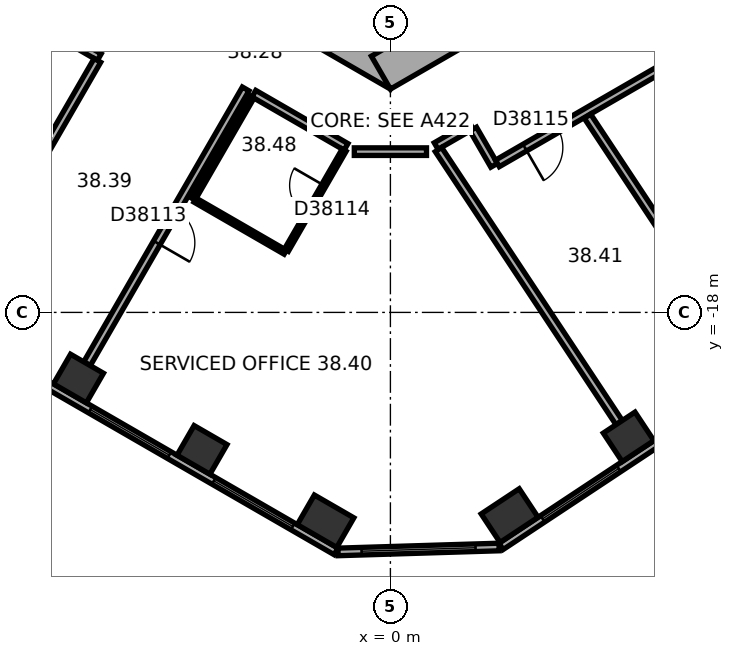
"""IFC4 building model, lengths in metres.
Left out: names, types, materials, properties, quantities, classifications, styles, units other than length and angle.
Written with IfcOpenShell. Run it as: python <this file> out.ifc"""

import sys

from ifc_helpers import new_model, si_unit, direction, frame, frame_2d, origin, origin_2d, place, context, subcontext, project, spatial, rectangle, extrude, element, fill, save


model = new_model("IFC4")
c1 = context("Model", 3, precision=1e-05, world=origin(), true_north=direction((0.0, 1.0)))
c2 = subcontext(c1, "Body", "Model", "MODEL_VIEW")
j1 = project(units=[si_unit("LENGTHUNIT", "METRE"), si_unit("PLANEANGLEUNIT", "RADIAN")], contexts=[c1])
p1 = place(None, origin())
s1 = spatial("IfcSite", under=j1, at=p1, CompositionType="ELEMENT")
p2 = place(p1, origin())
s2 = spatial("IfcBuilding", under=s1, at=p2, CompositionType="ELEMENT")
p3 = place(p2, frame((0.0, 0.0, 157.7)))
s3 = spatial("IfcBuildingStorey", under=s2, at=p3, CompositionType="ELEMENT", Elevation=157.7)
for number, where, z_axis, x_axis in (
    (1, (-8.208, -19.74, 0.0), (0.0, 0.0, 1.0), (0.866, -0.5, 0.0)),
    (2, (-4.958, -21.617, 0.0), (0.0, 0.0, 1.0), (0.866, -0.5, 0.0)),
):
    element("IfcColumn", number, at=place(p3, frame(where, z_axis=z_axis, x_axis=x_axis)), inside=s3, PredefinedType="COLUMN", context=c2, shape_type="SweptSolid", body=[
        extrude(rectangle(XDim=1.0, YDim=0.9, at=origin_2d()), origin(), (0.0, 0.0, 1.0), 3.7),
    ])
for number, where, z_axis, x_axis in (
    (3, (-1.706, -23.494, 0.0), (0.0, 0.0, 1.0), (0.866, -0.5, 0.0)),
    (4, (3.137, -23.346, 0.0), (0.0, 0.0, 1.0), (0.834, 0.552, 0.0)),
):
    element("IfcColumn", number, at=place(p3, frame(where, z_axis=z_axis, x_axis=x_axis)), inside=s3, PredefinedType="COLUMN", context=c2, shape_type="SweptSolid", body=[
        extrude(rectangle(XDim=1.2, YDim=0.9, at=origin_2d()), origin(), (0.0, 0.0, 1.0), 3.7),
    ])
p4 = place(p3, frame((6.268, -21.274, 0.0), z_axis=(0.0, 0.0, 1.0), x_axis=(0.833885822067, 0.551936985312, 0.0)))
e5 = element("IfcColumn", 5, at=p4, inside=s3, PredefinedType="COLUMN", context=c2, shape_type="SweptSolid", body=[
    extrude(rectangle(XDim=1.0, YDim=0.9, at=origin_2d()), origin(), (0.0, 0.0, 1.0), 3.7),
])
p5 = place(p3, frame((-10.25, -5.629, 0.0), z_axis=(0.0, 0.0, 1.0), x_axis=(0.866022616891, -0.50000482701, 0.0)))
e6 = element("IfcWall", 6, at=p5, inside=s3, PredefinedType="SHEAR", context=c2, shape_type="SweptSolid", body=[
    extrude(rectangle(XDim=12.125, YDim=1.0, at=frame_2d((6.062, 0.0))), origin(), (0.0, 0.0, 1.0), 3.7),
])
p6 = place(p5, frame((6.262, 0.0, 0.0)))
e7 = element("IfcOpeningElement", 7, at=p6, cuts=e6, PredefinedType="OPENING", context=c2, shape_type="SweptSolid", body=[
    extrude(rectangle(XDim=1.5, YDim=2.1, at=frame_2d((0.75, 1.05))), frame((0.0, 0.51, 0.0), z_axis=(0.0, -1.0, 0.0), x_axis=(1.0, 0.0, 0.0)), (0.0, 0.0, 1.0), 1.02),
])
p7 = place(p5, frame((1.712, 0.0, 0.0)))
e8 = element("IfcOpeningElement", 8, at=p7, cuts=e6, PredefinedType="OPENING", context=c2, shape_type="SweptSolid", body=[
    extrude(rectangle(XDim=1.1, YDim=2.1, at=frame_2d((0.55, 1.05))), frame((0.0, 0.51, 0.0), z_axis=(0.0, -1.0, 0.0), x_axis=(1.0, 0.0, 0.0)), (0.0, 0.0, 1.0), 1.02),
])
p8 = place(p5, frame((4.312, 0.0, 0.0)))
e9 = element("IfcOpeningElement", 9, at=p8, cuts=e6, PredefinedType="OPENING", context=c2, shape_type="SweptSolid", body=[
    extrude(rectangle(XDim=1.1, YDim=2.1, at=frame_2d((0.55, 1.05))), frame((0.0, 0.51, 0.0), z_axis=(0.0, -1.0, 0.0), x_axis=(1.0, 0.0, 0.0)), (0.0, 0.0, 1.0), 1.02),
])
p9 = place(p3, frame((-0.25, -11.691, 0.0), z_axis=(0.0, 0.0, 1.0), x_axis=(0.866022616891, 0.50000482701, 0.0)))
e10 = element("IfcWall", 10, at=p9, inside=s3, PredefinedType="SHEAR", context=c2, shape_type="SweptSolid", body=[
    extrude(rectangle(XDim=12.125, YDim=1.0, at=frame_2d((6.062, 0.0))), origin(), (0.0, 0.0, 1.0), 3.7),
])
p10 = place(p9, frame((2.612, 0.0, 0.0)))
e11 = element("IfcOpeningElement", 11, at=p10, cuts=e10, PredefinedType="OPENING", context=c2, shape_type="SweptSolid", body=[
    extrude(rectangle(XDim=1.1, YDim=2.1, at=frame_2d((0.55, 1.05))), frame((0.0, 0.51, 0.0), z_axis=(0.0, -1.0, 0.0), x_axis=(1.0, 0.0, 0.0)), (0.0, 0.0, 1.0), 1.02),
])
p11 = place(p9, frame((5.212, 0.0, 0.0)))
e12 = element("IfcOpeningElement", 12, at=p11, cuts=e10, PredefinedType="OPENING", context=c2, shape_type="SweptSolid", body=[
    extrude(rectangle(XDim=1.1, YDim=2.1, at=frame_2d((0.55, 1.05))), frame((0.0, 0.51, 0.0), z_axis=(0.0, -1.0, 0.0), x_axis=(1.0, 0.0, 0.0)), (0.0, 0.0, 1.0), 1.02),
])
p12 = place(p9, frame((7.812, 0.0, 0.0)))
e13 = element("IfcOpeningElement", 13, at=p12, cuts=e10, PredefinedType="OPENING", context=c2, shape_type="SweptSolid", body=[
    extrude(rectangle(XDim=1.1, YDim=2.1, at=frame_2d((0.55, 1.05))), frame((0.0, 0.51, 0.0), z_axis=(0.0, -1.0, 0.0), x_axis=(1.0, 0.0, 0.0)), (0.0, 0.0, 1.0), 1.02),
])
p13 = place(p3, frame((-18.789, -14.267, 0.0), z_axis=(0.0, 0.0, 1.0), x_axis=(0.866023315909, -0.500003616288, 0.0)))
e14 = element("IfcWall", 14, at=p13, inside=s3, PredefinedType="STANDARD", context=c2, shape_type="SweptSolid", body=[
    extrude(rectangle(XDim=20.044, YDim=0.2, at=frame_2d((10.022, 0.0))), origin(), (0.0, 0.0, 1.0), 3.7),
])
p14 = place(p13, frame((1.314, 0.0, 0.9)))
e15 = element("IfcOpeningElement", 15, at=p14, cuts=e14, PredefinedType="OPENING", context=c2, shape_type="SweptSolid", body=[
    extrude(rectangle(XDim=2.4, YDim=2.0, at=frame_2d((1.2, 1.0))), frame((0.0, 0.11, 0.0), z_axis=(0.0, -1.0, 0.0), x_axis=(1.0, 0.0, 0.0)), (0.0, 0.0, 1.0), 0.22),
])
p15 = place(p13, frame((5.069, 0.0, 0.9)))
e16 = element("IfcOpeningElement", 16, at=p15, cuts=e14, PredefinedType="OPENING", context=c2, shape_type="SweptSolid", body=[
    extrude(rectangle(XDim=2.4, YDim=2.0, at=frame_2d((1.2, 1.0))), frame((0.0, 0.11, 0.0), z_axis=(0.0, -1.0, 0.0), x_axis=(1.0, 0.0, 0.0)), (0.0, 0.0, 1.0), 0.22),
])
p16 = place(p13, frame((8.823, 0.0, 0.9)))
e17 = element("IfcOpeningElement", 17, at=p16, cuts=e14, PredefinedType="OPENING", context=c2, shape_type="SweptSolid", body=[
    extrude(rectangle(XDim=2.4, YDim=2.0, at=frame_2d((1.2, 1.0))), frame((0.0, 0.11, 0.0), z_axis=(0.0, -1.0, 0.0), x_axis=(1.0, 0.0, 0.0)), (0.0, 0.0, 1.0), 0.22),
])
p17 = place(p13, frame((12.577, 0.0, 0.9)))
e18 = element("IfcOpeningElement", 18, at=p17, cuts=e14, PredefinedType="OPENING", context=c2, shape_type="SweptSolid", body=[
    extrude(rectangle(XDim=2.4, YDim=2.0, at=frame_2d((1.2, 1.0))), frame((0.0, 0.11, 0.0), z_axis=(0.0, -1.0, 0.0), x_axis=(1.0, 0.0, 0.0)), (0.0, 0.0, 1.0), 0.22),
])
p18 = place(p13, frame((16.331, 0.0, 0.9)))
e19 = element("IfcOpeningElement", 19, at=p18, cuts=e14, PredefinedType="OPENING", context=c2, shape_type="SweptSolid", body=[
    extrude(rectangle(XDim=2.4, YDim=2.0, at=frame_2d((1.2, 1.0))), frame((0.0, 0.11, 0.0), z_axis=(0.0, -1.0, 0.0), x_axis=(1.0, 0.0, 0.0)), (0.0, 0.0, 1.0), 0.22),
])
p19 = place(p3, frame((-1.378, -24.302, 0.0), z_axis=(0.0, 0.0, 1.0), x_axis=(0.999533857267, 0.030529791629, 0.0)))
e20 = element("IfcWall", 20, at=p19, inside=s3, PredefinedType="STANDARD", context=c2, shape_type="SweptSolid", body=[
    extrude(rectangle(XDim=4.238, YDim=0.2, at=frame_2d((2.119, 0.0))), origin(), (0.0, 0.0, 1.0), 3.7),
])
p20 = place(p19, frame((0.619, 0.0, 0.9)))
e21 = element("IfcOpeningElement", 21, at=p20, cuts=e20, PredefinedType="OPENING", context=c2, shape_type="SweptSolid", body=[
    extrude(rectangle(XDim=3.0, YDim=2.0, at=frame_2d((1.5, 1.0))), frame((0.0, 0.11, 0.0), z_axis=(0.0, -1.0, 0.0), x_axis=(1.0, 0.0, 0.0)), (0.0, 0.0, 1.0), 0.22),
])
p21 = place(p3, frame((2.911, -24.156, 0.0), z_axis=(0.0, 0.0, 1.0), x_axis=(0.833882163564, 0.551942512668, 0.0)))
e22 = element("IfcWall", 22, at=p21, inside=s3, PredefinedType="STANDARD", context=c2, shape_type="SweptSolid", body=[
    extrude(rectangle(XDim=20.044, YDim=0.2, at=frame_2d((10.022, 0.0))), origin(), (0.0, 0.0, 1.0), 3.7),
])
p22 = place(p21, frame((1.313, 0.0, 0.9)))
e23 = element("IfcOpeningElement", 23, at=p22, cuts=e22, PredefinedType="OPENING", context=c2, shape_type="SweptSolid", body=[
    extrude(rectangle(XDim=2.4, YDim=2.0, at=frame_2d((1.2, 1.0))), frame((0.0, 0.11, 0.0), z_axis=(0.0, -1.0, 0.0), x_axis=(1.0, 0.0, 0.0)), (0.0, 0.0, 1.0), 0.22),
])
p23 = place(p21, frame((5.067, 0.0, 0.9)))
e24 = element("IfcOpeningElement", 24, at=p23, cuts=e22, PredefinedType="OPENING", context=c2, shape_type="SweptSolid", body=[
    extrude(rectangle(XDim=2.4, YDim=2.0, at=frame_2d((1.2, 1.0))), frame((0.0, 0.11, 0.0), z_axis=(0.0, -1.0, 0.0), x_axis=(1.0, 0.0, 0.0)), (0.0, 0.0, 1.0), 0.22),
])
p24 = place(p21, frame((8.821, 0.0, 0.9)))
e25 = element("IfcOpeningElement", 25, at=p24, cuts=e22, PredefinedType="OPENING", context=c2, shape_type="SweptSolid", body=[
    extrude(rectangle(XDim=2.4, YDim=2.0, at=frame_2d((1.2, 1.0))), frame((0.0, 0.11, 0.0), z_axis=(0.0, -1.0, 0.0), x_axis=(1.0, 0.0, 0.0)), (0.0, 0.0, 1.0), 0.22),
])
p25 = place(p21, frame((12.575, 0.0, 0.9)))
e26 = element("IfcOpeningElement", 26, at=p25, cuts=e22, PredefinedType="OPENING", context=c2, shape_type="SweptSolid", body=[
    extrude(rectangle(XDim=2.4, YDim=2.0, at=frame_2d((1.2, 1.0))), frame((0.0, 0.11, 0.0), z_axis=(0.0, -1.0, 0.0), x_axis=(1.0, 0.0, 0.0)), (0.0, 0.0, 1.0), 0.22),
])
p26 = place(p21, frame((16.329, 0.0, 0.9)))
e27 = element("IfcOpeningElement", 27, at=p26, cuts=e22, PredefinedType="OPENING", context=c2, shape_type="SweptSolid", body=[
    extrude(rectangle(XDim=2.4, YDim=2.0, at=frame_2d((1.2, 1.0))), frame((0.0, 0.11, 0.0), z_axis=(0.0, -1.0, 0.0), x_axis=(1.0, 0.0, 0.0)), (0.0, 0.0, 1.0), 0.22),
])
p27 = place(p3, frame((-11.651, -8.978, 0.0), z_axis=(0.0, 0.0, 1.0), x_axis=(0.866010893236, -0.500025132165, 0.0)))
e28 = element("IfcWall", 28, at=p27, inside=s3, PredefinedType="PARTITIONING", context=c2, shape_type="SweptSolid", body=[
    extrude(rectangle(XDim=4.608, YDim=0.2, at=frame_2d((2.304, 0.0))), origin(), (0.0, 0.0, 1.0), 3.42),
])
p28 = place(p3, frame((-11.235, -17.474, 0.0), z_axis=(0.0, 0.0, 1.0), x_axis=(0.500009260695, 0.866020057054, 0.0)))
e29 = element("IfcWall", 29, at=p28, inside=s3, PredefinedType="PARTITIONING", context=c2, shape_type="SweptSolid", body=[
    extrude(rectangle(XDim=7.049, YDim=0.2, at=frame_2d((3.524, 0.0))), origin(), (0.0, 0.0, 1.0), 2.87),
])
p29 = place(p28, frame((3.024, 0.0, 0.0)))
e30 = element("IfcOpeningElement", 30, at=p29, cuts=e29, PredefinedType="OPENING", context=c2, shape_type="SweptSolid", body=[
    extrude(rectangle(XDim=1.0, YDim=2.1, at=frame_2d((0.5, 1.05))), frame((0.0, 0.11, 0.0), z_axis=(0.0, -1.0, 0.0), x_axis=(1.0, 0.0, 0.0)), (0.0, 0.0, 1.0), 0.22),
])
p30 = place(p3, frame((-7.984, -19.351, 0.0), z_axis=(0.0, 0.0, 1.0), x_axis=(0.500010139422, 0.866019549707, 0.0)))
e31 = element("IfcWall", 31, at=p30, inside=s3, PredefinedType="PARTITIONING", context=c2, shape_type="SweptSolid", body=[
    extrude(rectangle(XDim=8.35, YDim=0.2, at=frame_2d((4.175, 0.0))), origin(), (0.0, 0.0, 1.0), 3.42),
])
p31 = place(p30, frame((3.675, 0.0, 0.0)))
e32 = element("IfcOpeningElement", 32, at=p31, cuts=e31, PredefinedType="OPENING", context=c2, shape_type="SweptSolid", body=[
    extrude(rectangle(XDim=1.0, YDim=2.1, at=frame_2d((0.5, 1.05))), frame((0.0, 0.11, 0.0), z_axis=(0.0, -1.0, 0.0), x_axis=(1.0, 0.0, 0.0)), (0.0, 0.0, 1.0), 0.22),
])
p32 = place(p3, frame((-5.192, -15.016, 0.0), z_axis=(0.0, 0.0, 1.0), x_axis=(0.500026960575, 0.86600983753, 0.0)))
e33 = element("IfcWall", 33, at=p32, inside=s3, PredefinedType="PARTITIONING", context=c2, shape_type="SweptSolid", body=[
    extrude(rectangle(XDim=3.1, YDim=0.12, at=frame_2d((1.55, 0.0))), origin(), (0.0, 0.0, 1.0), 3.42),
])
p33 = place(p3, frame((-3.592, -12.244, 0.0), z_axis=(0.0, 0.0, 1.0), x_axis=(0.866034573852, -0.49998411664, 0.0)))
e34 = element("IfcWall", 34, at=p33, inside=s3, PredefinedType="PARTITIONING", context=c2, shape_type="SweptSolid", body=[
    extrude(rectangle(XDim=2.8, YDim=0.2, at=frame_2d((1.4, 0.0))), origin(), (0.0, 0.0, 1.0), 3.42),
])
p34 = place(p3, frame((-2.767, -16.416, 0.0), z_axis=(0.0, 0.0, 1.0), x_axis=(-0.865997131366, 0.500048966069, 0.0)))
e35 = element("IfcWall", 35, at=p34, inside=s3, PredefinedType="PARTITIONING", context=c2, shape_type="SweptSolid", body=[
    extrude(rectangle(XDim=2.74, YDim=0.12, at=frame_2d((1.37, 0.0))), origin(), (0.0, 0.0, 1.0), 3.42),
])
p35 = place(p3, frame((-1.217, -13.731, 0.0), z_axis=(0.0, 0.0, 1.0), x_axis=(-0.499991248344, -0.866030456496, 0.0)))
e36 = element("IfcWall", 36, at=p35, inside=s3, PredefinedType="PARTITIONING", context=c2, shape_type="SweptSolid", body=[
    extrude(rectangle(XDim=3.04, YDim=0.12, at=frame_2d((1.52, 0.0))), origin(), (0.0, 0.0, 1.0), 3.42),
])
p36 = place(p35, frame((1.07, 0.0, 0.0)))
e37 = element("IfcOpeningElement", 37, at=p36, cuts=e36, PredefinedType="OPENING", context=c2, shape_type="SweptSolid", body=[
    extrude(rectangle(XDim=0.9, YDim=2.1, at=frame_2d((0.45, 1.05))), frame((0.0, 0.07, 0.0), z_axis=(0.0, -1.0, 0.0), x_axis=(1.0, 0.0, 0.0)), (0.0, 0.0, 1.0), 0.14),
])
p37 = place(p3, frame((-0.95, -13.77, 0.0), z_axis=(0.0, 0.0, 1.0), x_axis=(1.0, 0.0, 0.0)))
e38 = element("IfcWall", 38, at=p37, inside=s3, PredefinedType="PARTITIONING", context=c2, shape_type="SweptSolid", body=[
    extrude(rectangle(XDim=1.9, YDim=0.2, at=frame_2d((0.95, 0.0))), origin(), (0.0, 0.0, 1.0), 3.42),
])
p38 = place(p3, frame((1.204, -13.623, 0.0), z_axis=(0.0, 0.0, 1.0), x_axis=(0.866040989419, 0.499973003918, 0.0)))
e39 = element("IfcWall", 39, at=p38, inside=s3, PredefinedType="PARTITIONING", context=c2, shape_type="SweptSolid", body=[
    extrude(rectangle(XDim=1.068, YDim=0.2, at=frame_2d((0.534, 0.0))), origin(), (0.0, 0.0, 1.0), 3.42),
])
p39 = place(p3, frame((2.179, -13.176, 0.0), z_axis=(0.0, 0.0, 1.0), x_axis=(0.499978356969, -0.866037899034, 0.0)))
e40 = element("IfcWall", 40, at=p39, inside=s3, PredefinedType="PARTITIONING", context=c2, shape_type="SweptSolid", body=[
    extrude(rectangle(XDim=1.101, YDim=0.2, at=frame_2d((0.551, 0.0))), origin(), (0.0, 0.0, 1.0), 3.42),
])
p40 = place(p3, frame((2.816, -14.079, 0.0), z_axis=(0.0, 0.0, 1.0), x_axis=(0.866021128829, 0.500007404367, 0.0)))
e41 = element("IfcWall", 41, at=p40, inside=s3, PredefinedType="PARTITIONING", context=c2, shape_type="SweptSolid", body=[
    extrude(rectangle(XDim=8.702, YDim=0.2, at=frame_2d((4.351, 0.0))), origin(), (0.0, 0.0, 1.0), 3.42),
])
p41 = place(p40, frame((0.833, 0.0, 0.0)))
e42 = element("IfcOpeningElement", 42, at=p41, cuts=e41, PredefinedType="OPENING", context=c2, shape_type="SweptSolid", body=[
    extrude(rectangle(XDim=1.0, YDim=2.1, at=frame_2d((0.5, 1.05))), frame((0.0, 0.11, 0.0), z_axis=(0.0, -1.0, 0.0), x_axis=(1.0, 0.0, 0.0)), (0.0, 0.0, 1.0), 0.22),
])
p42 = place(p3, frame((6.02, -20.899, 0.0), z_axis=(0.0, 0.0, 1.0), x_axis=(-0.551943990108, 0.833881185651, 0.0)))
e43 = element("IfcWall", 43, at=p42, inside=s3, PredefinedType="PARTITIONING", context=c2, shape_type="SweptSolid", body=[
    extrude(rectangle(XDim=8.615, YDim=0.2, at=frame_2d((4.308, 0.0))), origin(), (0.0, 0.0, 1.0), 3.42),
])
p43 = place(p3, frame((9.15, -18.827, 0.0), z_axis=(0.0, 0.0, 1.0), x_axis=(-0.551928083938, 0.83389171369, 0.0)))
e44 = element("IfcWall", 44, at=p43, inside=s3, PredefinedType="PARTITIONING", context=c2, shape_type="SweptSolid", body=[
    extrude(rectangle(XDim=7.182, YDim=0.2, at=frame_2d((3.591, 0.0))), origin(), (0.0, 0.0, 1.0), 2.87),
])
p44 = place(p17, origin())
e45 = element("IfcWindow", 45, at=p44, inside=s3, PartitioningType="SINGLE_PANEL", PredefinedType="WINDOW", context=c2, shape_type="SweptSolid", body=[
    extrude(rectangle(XDim=2.4, YDim=2.0, at=frame_2d((1.2, 1.0))), frame((0.0, 0.03, 0.0), z_axis=(0.0, -1.0, 0.0), x_axis=(1.0, 0.0, 0.0)), (0.0, 0.0, 1.0), 0.06),
])
fill(e18, e45)
p45 = place(p18, origin())
e46 = element("IfcWindow", 46, at=p45, inside=s3, PartitioningType="SINGLE_PANEL", PredefinedType="WINDOW", context=c2, shape_type="SweptSolid", body=[
    extrude(rectangle(XDim=2.4, YDim=2.0, at=frame_2d((1.2, 1.0))), frame((0.0, 0.03, 0.0), z_axis=(0.0, -1.0, 0.0), x_axis=(1.0, 0.0, 0.0)), (0.0, 0.0, 1.0), 0.06),
])
fill(e19, e46)
p46 = place(p20, origin())
e47 = element("IfcWindow", 47, at=p46, inside=s3, PartitioningType="SINGLE_PANEL", PredefinedType="WINDOW", context=c2, shape_type="SweptSolid", body=[
    extrude(rectangle(XDim=3.0, YDim=2.0, at=frame_2d((1.5, 1.0))), frame((0.0, 0.03, 0.0), z_axis=(0.0, -1.0, 0.0), x_axis=(1.0, 0.0, 0.0)), (0.0, 0.0, 1.0), 0.06),
])
fill(e21, e47)
p47 = place(p22, origin())
e48 = element("IfcWindow", 48, at=p47, inside=s3, PartitioningType="SINGLE_PANEL", PredefinedType="WINDOW", context=c2, shape_type="SweptSolid", body=[
    extrude(rectangle(XDim=2.4, YDim=2.0, at=frame_2d((1.2, 1.0))), frame((0.0, 0.03, 0.0), z_axis=(0.0, -1.0, 0.0), x_axis=(1.0, 0.0, 0.0)), (0.0, 0.0, 1.0), 0.06),
])
fill(e23, e48)
p48 = place(p31, origin())
e49 = element("IfcDoor", 49, at=p48, inside=s3, OperationType="SINGLE_SWING_LEFT", PredefinedType="DOOR", context=c2, shape_type="SweptSolid", body=[
    extrude(rectangle(XDim=1.0, YDim=2.1, at=frame_2d((0.5, 1.05))), frame((0.0, 0.025, 0.0), z_axis=(0.0, -1.0, 0.0), x_axis=(1.0, 0.0, 0.0)), (0.0, 0.0, 1.0), 0.05),
])
fill(e32, e49)
p49 = place(p36, origin())
e50 = element("IfcDoor", 50, at=p49, inside=s3, OperationType="SINGLE_SWING_LEFT", PredefinedType="DOOR", context=c2, shape_type="SweptSolid", body=[
    extrude(rectangle(XDim=0.9, YDim=2.1, at=frame_2d((0.45, 1.05))), frame((0.0, 0.025, 0.0), z_axis=(0.0, -1.0, 0.0), x_axis=(1.0, 0.0, 0.0)), (0.0, 0.0, 1.0), 0.05),
])
fill(e37, e50)
p50 = place(p41, origin())
e51 = element("IfcDoor", 51, at=p50, inside=s3, OperationType="SINGLE_SWING_LEFT", PredefinedType="DOOR", context=c2, shape_type="SweptSolid", body=[
    extrude(rectangle(XDim=1.0, YDim=2.1, at=frame_2d((0.5, 1.05))), frame((0.0, 0.025, 0.0), z_axis=(0.0, -1.0, 0.0), x_axis=(1.0, 0.0, 0.0)), (0.0, 0.0, 1.0), 0.05),
])
fill(e42, e51)
save(model, sys.argv[1])
